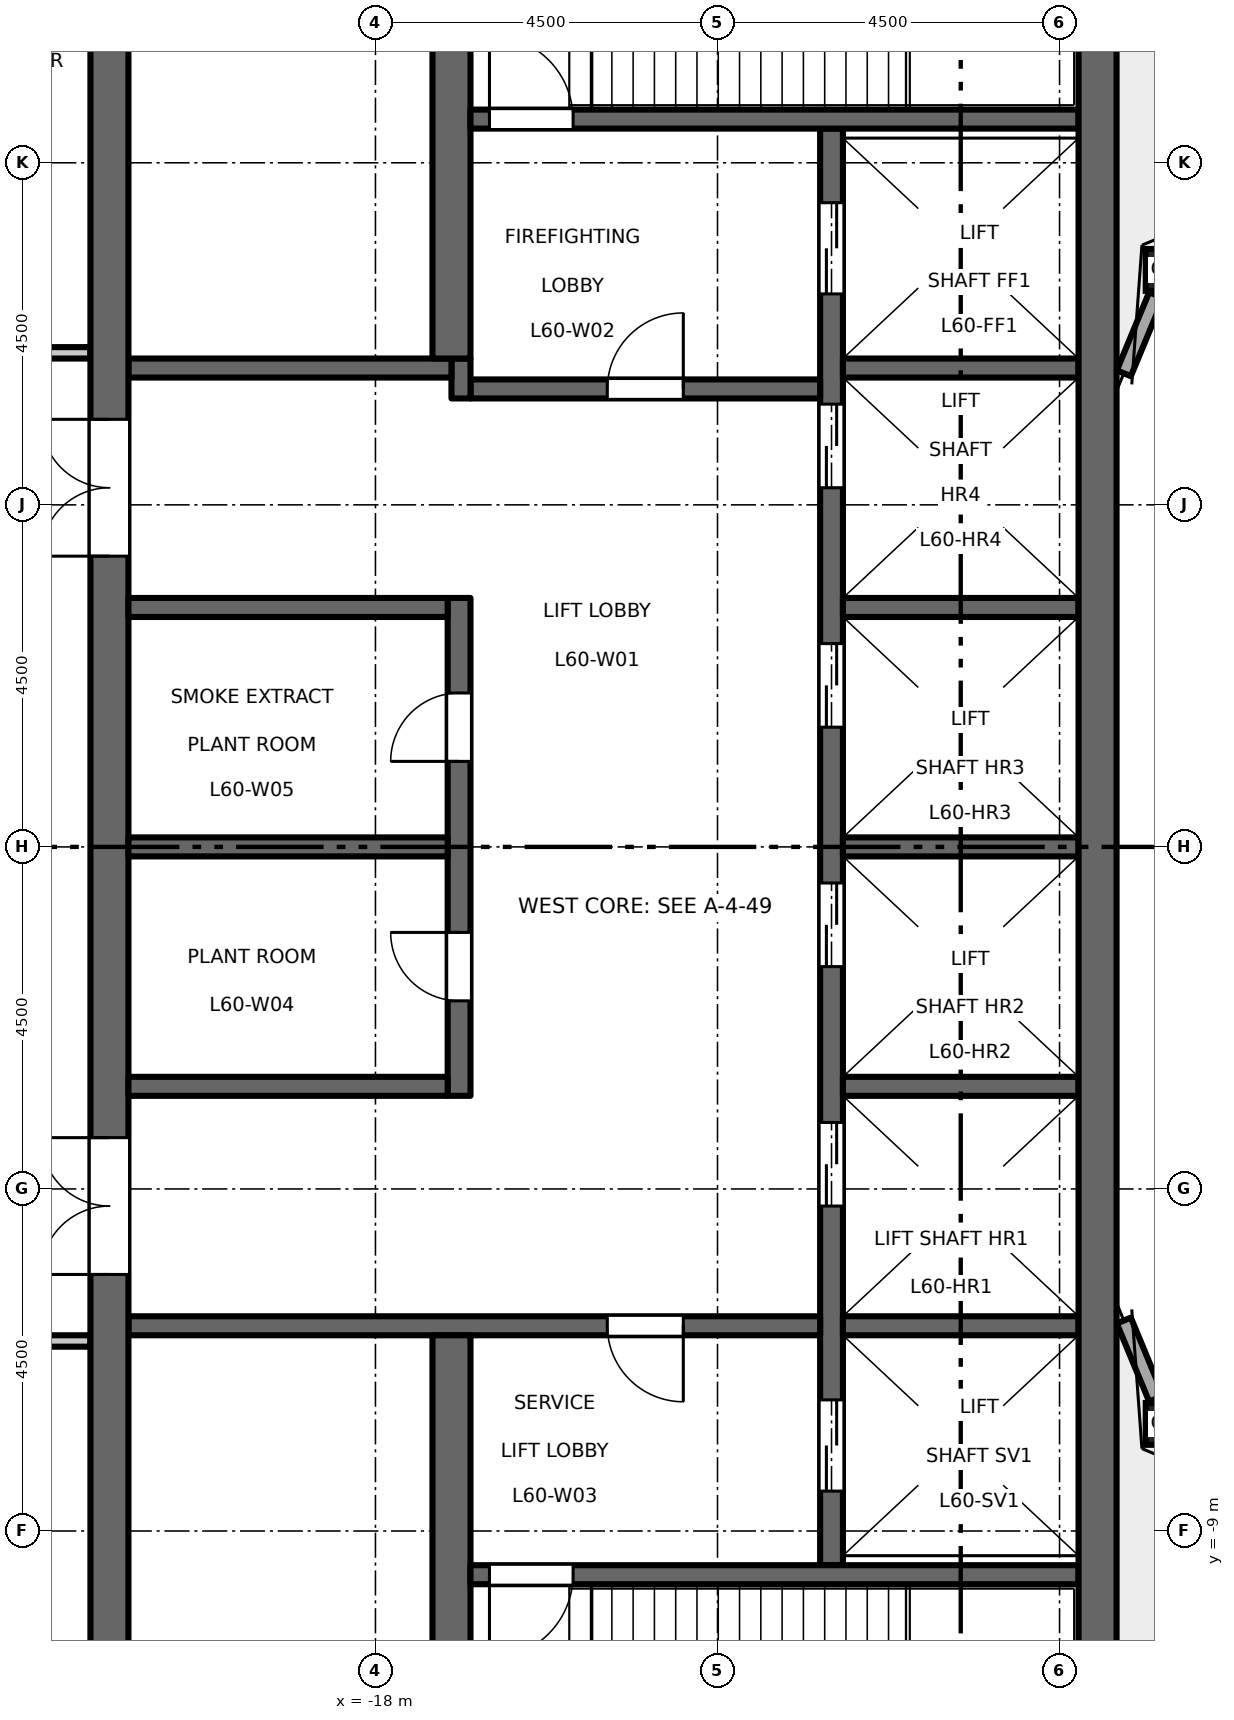
"""IFC4 building model, lengths in metres.
Left out: names, types, materials, properties, quantities, classifications, styles, units other than length and angle.
Written with IfcOpenShell. Run it as: python <this file> out.ifc"""

import sys

from ifc_helpers import new_model, si_unit, direction, frame, frame_2d, origin, origin_2d, place, context, subcontext, project, spatial, rectangle, hollow_rectangle, extrude, element, fill, save


model = new_model("IFC4")
c1 = context("Model", 3, precision=1e-05, world=origin(), true_north=direction((0.0, 1.0)))
c2 = subcontext(c1, "Body", "Model", "MODEL_VIEW")
j1 = project(units=[si_unit("LENGTHUNIT", "METRE"), si_unit("PLANEANGLEUNIT", "RADIAN")], contexts=[c1])
p1 = place(None, origin())
s1 = spatial("IfcSite", under=j1, at=p1, CompositionType="ELEMENT")
p2 = place(p1, origin())
s2 = spatial("IfcBuilding", under=s1, at=p2, CompositionType="ELEMENT")
p3 = place(p2, frame((0.0, 0.0, 278.2)))
s3 = spatial("IfcBuildingStorey", under=s2, at=p3, CompositionType="ELEMENT", Elevation=278.2)
for number, where, z_axis, x_axis in (
    (1, (-7.591, -7.591, 0.0), (0.0, 0.0, 1.0), (1.0, 0.0, 0.0)),
    (2, (-7.591, 7.591, 0.0), (0.0, 0.0, 1.0), (1.0, 0.0, 0.0)),
):
    element("IfcColumn", number, at=place(p3, frame(where, z_axis=z_axis, x_axis=x_axis)), inside=s3, PredefinedType="COLUMN", context=c2, shape_type="SweptSolid", body=[
        extrude(hollow_rectangle(XDim=0.55, YDim=0.55, WallThickness=0.028, at=origin_2d()), origin(), (0.0, 0.0, 1.0), 6.0),
    ])
p4 = place(p3, frame((-12.0, -9.45, 0.0), z_axis=(0.0, 0.0, 1.0), x_axis=(0.0, 1.0, 0.0)))
e3 = element("IfcWall", 3, at=p4, inside=s3, PredefinedType="SHEAR", context=c2, shape_type="SweptSolid", body=[
    extrude(rectangle(XDim=18.9, YDim=0.3, at=frame_2d((9.45, 0.0))), origin(), (0.0, 0.0, 1.0), 5.8),
])
p5 = place(p4, frame((4.725, 0.0, 0.0)))
e4 = element("IfcOpeningElement", 4, at=p5, cuts=e3, PredefinedType="OPENING", context=c2, shape_type="SweptSolid", body=[
    extrude(rectangle(XDim=1.1, YDim=2.1, at=frame_2d((0.55, 1.05))), frame((0.0, 0.16, 0.0), z_axis=(0.0, -1.0, 0.0), x_axis=(1.0, 0.0, 0.0)), (0.0, 0.0, 1.0), 0.32),
])
p6 = place(p4, frame((7.875, 0.0, 0.0)))
e5 = element("IfcOpeningElement", 5, at=p6, cuts=e3, PredefinedType="OPENING", context=c2, shape_type="SweptSolid", body=[
    extrude(rectangle(XDim=1.1, YDim=2.1, at=frame_2d((0.55, 1.05))), frame((0.0, 0.16, 0.0), z_axis=(0.0, -1.0, 0.0), x_axis=(1.0, 0.0, 0.0)), (0.0, 0.0, 1.0), 0.32),
])
p7 = place(p4, frame((11.025, 0.0, 0.0)))
e6 = element("IfcOpeningElement", 6, at=p7, cuts=e3, PredefinedType="OPENING", context=c2, shape_type="SweptSolid", body=[
    extrude(rectangle(XDim=1.1, YDim=2.1, at=frame_2d((0.55, 1.05))), frame((0.0, 0.16, 0.0), z_axis=(0.0, -1.0, 0.0), x_axis=(1.0, 0.0, 0.0)), (0.0, 0.0, 1.0), 0.32),
])
p8 = place(p4, frame((14.175, 0.0, 0.0)))
e7 = element("IfcOpeningElement", 7, at=p8, cuts=e3, PredefinedType="OPENING", context=c2, shape_type="SweptSolid", body=[
    extrude(rectangle(XDim=1.1, YDim=2.1, at=frame_2d((0.55, 1.05))), frame((0.0, 0.16, 0.0), z_axis=(0.0, -1.0, 0.0), x_axis=(1.0, 0.0, 0.0)), (0.0, 0.0, 1.0), 0.32),
])
p9 = place(p4, frame((16.725, 0.0, 0.0)))
e8 = element("IfcOpeningElement", 8, at=p9, cuts=e3, PredefinedType="OPENING", context=c2, shape_type="SweptSolid", body=[
    extrude(rectangle(XDim=1.2, YDim=2.1, at=frame_2d((0.6, 1.05))), frame((0.0, 0.16, 0.0), z_axis=(0.0, -1.0, 0.0), x_axis=(1.0, 0.0, 0.0)), (0.0, 0.0, 1.0), 0.32),
])
p10 = place(p4, frame((0.975, 0.0, 0.0)))
e9 = element("IfcOpeningElement", 9, at=p10, cuts=e3, PredefinedType="OPENING", context=c2, shape_type="SweptSolid", body=[
    extrude(rectangle(XDim=1.2, YDim=2.1, at=frame_2d((0.6, 1.05))), frame((0.0, 0.16, 0.0), z_axis=(0.0, -1.0, 0.0), x_axis=(1.0, 0.0, 0.0)), (0.0, 0.0, 1.0), 0.32),
])
p11 = place(p3, frame((-12.15, 6.025, 0.0), z_axis=(0.0, 0.0, 1.0), x_axis=(-1.0, 0.0, 0.0)))
e10 = element("IfcWall", 10, at=p11, inside=s3, PredefinedType="SHEAR", context=c2, shape_type="SweptSolid", body=[
    extrude(rectangle(XDim=4.6, YDim=0.25, at=frame_2d((2.3, 0.0))), origin(), (0.0, 0.0, 1.0), 5.8),
])
p12 = place(p11, frame((1.8, 0.0, 0.0)))
e11 = element("IfcOpeningElement", 11, at=p12, cuts=e10, PredefinedType="OPENING", context=c2, shape_type="SweptSolid", body=[
    extrude(rectangle(XDim=1.0, YDim=2.1, at=frame_2d((0.5, 1.05))), frame((0.0, 0.135, 0.0), z_axis=(0.0, -1.0, 0.0), x_axis=(1.0, 0.0, 0.0)), (0.0, 0.0, 1.0), 0.27),
])
p13 = place(p3, frame((-16.875, 5.9, 0.0), z_axis=(0.0, 0.0, 1.0), x_axis=(0.0, 1.0, 0.0)))
e12 = element("IfcWall", 12, at=p13, inside=s3, PredefinedType="SHEAR", context=c2, shape_type="SweptSolid", body=[
    extrude(rectangle(XDim=0.525, YDim=0.25, at=frame_2d((0.263, 0.0))), origin(), (0.0, 0.0, 1.0), 5.8),
])
p14 = place(p3, frame((-17.0, 6.3, 0.0), z_axis=(0.0, 0.0, 1.0), x_axis=(-1.0, 0.0, 0.0)))
e13 = element("IfcWall", 13, at=p14, inside=s3, PredefinedType="SHEAR", context=c2, shape_type="SweptSolid", body=[
    extrude(rectangle(XDim=4.25, YDim=0.25, at=frame_2d((2.125, 0.0))), origin(), (0.0, 0.0, 1.0), 5.8),
])
p15 = place(p3, frame((-12.15, -6.3, 0.0), z_axis=(0.0, 0.0, 1.0), x_axis=(-1.0, 0.0, 0.0)))
e14 = element("IfcWall", 14, at=p15, inside=s3, PredefinedType="SHEAR", context=c2, shape_type="SweptSolid", body=[
    extrude(rectangle(XDim=9.1, YDim=0.25, at=frame_2d((4.55, 0.0))), origin(), (0.0, 0.0, 1.0), 5.8),
])
p16 = place(p15, frame((1.8, 0.0, 0.0)))
e15 = element("IfcOpeningElement", 15, at=p16, cuts=e14, PredefinedType="OPENING", context=c2, shape_type="SweptSolid", body=[
    extrude(rectangle(XDim=1.0, YDim=2.1, at=frame_2d((0.5, 1.05))), frame((0.0, 0.135, 0.0), z_axis=(0.0, -1.0, 0.0), x_axis=(1.0, 0.0, 0.0)), (0.0, 0.0, 1.0), 0.27),
])
p17 = place(p3, frame((-21.5, -13.0, 0.0), z_axis=(0.0, 0.0, 1.0), x_axis=(0.0, 1.0, 0.0)))
e16 = element("IfcWall", 16, at=p17, inside=s3, PredefinedType="SHEAR", context=c2, shape_type="SweptSolid", body=[
    extrude(rectangle(XDim=26.0, YDim=0.5, at=frame_2d((13.0, 0.0))), origin(), (0.0, 0.0, 1.0), 5.8),
])
p18 = place(p17, frame((16.825, 0.0, 0.0)))
e17 = element("IfcOpeningElement", 17, at=p18, cuts=e16, PredefinedType="OPENING", context=c2, shape_type="SweptSolid", body=[
    extrude(rectangle(XDim=1.8, YDim=2.1, at=frame_2d((0.9, 1.05))), frame((0.0, 0.26, 0.0), z_axis=(0.0, -1.0, 0.0), x_axis=(1.0, 0.0, 0.0)), (0.0, 0.0, 1.0), 0.52),
])
p19 = place(p17, frame((7.375, 0.0, 0.0)))
e18 = element("IfcOpeningElement", 18, at=p19, cuts=e16, PredefinedType="OPENING", context=c2, shape_type="SweptSolid", body=[
    extrude(rectangle(XDim=1.8, YDim=2.1, at=frame_2d((0.9, 1.05))), frame((0.0, 0.26, 0.0), z_axis=(0.0, -1.0, 0.0), x_axis=(1.0, 0.0, 0.0)), (0.0, 0.0, 1.0), 0.52),
])
p20 = place(p3, frame((-16.9, -3.275, 0.0), z_axis=(0.0, 0.0, 1.0), x_axis=(0.0, 1.0, 0.0)))
e19 = element("IfcWall", 19, at=p20, inside=s3, PredefinedType="SHEAR", context=c2, shape_type="SweptSolid", body=[
    extrude(rectangle(XDim=6.55, YDim=0.3, at=frame_2d((3.275, 0.0))), origin(), (0.0, 0.0, 1.0), 5.8),
])
p21 = place(p20, frame((1.25, 0.0, 0.0)))
e20 = element("IfcOpeningElement", 20, at=p21, cuts=e19, PredefinedType="OPENING", context=c2, shape_type="SweptSolid", body=[
    extrude(rectangle(XDim=0.9, YDim=2.1, at=frame_2d((0.45, 1.05))), frame((0.0, 0.16, 0.0), z_axis=(0.0, -1.0, 0.0), x_axis=(1.0, 0.0, 0.0)), (0.0, 0.0, 1.0), 0.32),
])
p22 = place(p20, frame((4.4, 0.0, 0.0)))
e21 = element("IfcOpeningElement", 21, at=p22, cuts=e19, PredefinedType="OPENING", context=c2, shape_type="SweptSolid", body=[
    extrude(rectangle(XDim=0.9, YDim=2.1, at=frame_2d((0.45, 1.05))), frame((0.0, 0.16, 0.0), z_axis=(0.0, -1.0, 0.0), x_axis=(1.0, 0.0, 0.0)), (0.0, 0.0, 1.0), 0.32),
])
for number, where, z_axis, x_axis in (
    (22, (-17.05, 0.0, 0.0), (0.0, 0.0, 1.0), (-1.0, 0.0, 0.0)),
    (23, (-17.05, 3.15, 0.0), (0.0, 0.0, 1.0), (-1.0, 0.0, 0.0)),
    (24, (-17.05, -3.15, 0.0), (0.0, 0.0, 1.0), (-1.0, 0.0, 0.0)),
):
    element("IfcWall", number, at=place(p3, frame(where, z_axis=z_axis, x_axis=x_axis)), inside=s3, PredefinedType="SHEAR", context=c2, shape_type="SweptSolid", body=[
        extrude(rectangle(XDim=4.2, YDim=0.25, at=frame_2d((2.1, 0.0))), origin(), (0.0, 0.0, 1.0), 5.8),
    ])
for number, where, z_axis, x_axis in (
    (25, (-17.0, 6.425, 0.0), (0.0, 0.0, 1.0), (0.0, 1.0, 0.0)),
    (26, (-17.0, -13.0, 0.0), (0.0, 0.0, 1.0), (0.0, 1.0, 0.0)),
):
    element("IfcWall", number, at=place(p3, frame(where, z_axis=z_axis, x_axis=x_axis)), inside=s3, PredefinedType="SHEAR", context=c2, shape_type="SweptSolid", body=[
        extrude(rectangle(XDim=6.575, YDim=0.5, at=frame_2d((3.288, 0.0))), origin(), (0.0, 0.0, 1.0), 5.8),
    ])
for number, where, z_axis, x_axis in (
    (27, (-8.75, 0.0, 0.0), (0.0, 0.0, 1.0), (-1.0, 0.0, 0.0)),
    (28, (-8.75, 3.15, 0.0), (0.0, 0.0, 1.0), (-1.0, 0.0, 0.0)),
    (29, (-8.75, 6.3, 0.0), (0.0, 0.0, 1.0), (-1.0, 0.0, 0.0)),
    (30, (-8.75, -3.15, 0.0), (0.0, 0.0, 1.0), (-1.0, 0.0, 0.0)),
    (31, (-8.75, -6.3, 0.0), (0.0, 0.0, 1.0), (-1.0, 0.0, 0.0)),
):
    element("IfcWall", number, at=place(p3, frame(where, z_axis=z_axis, x_axis=x_axis)), inside=s3, PredefinedType="SHEAR", context=c2, shape_type="SweptSolid", body=[
        extrude(rectangle(XDim=3.1, YDim=0.25, at=frame_2d((1.55, 0.0))), origin(), (0.0, 0.0, 1.0), 5.8),
    ])
p23 = place(p3, frame((-8.75, 9.575, 0.0), z_axis=(0.0, 0.0, 1.0), x_axis=(-1.0, 0.0, 0.0)))
e32 = element("IfcWall", 32, at=p23, inside=s3, PredefinedType="SHEAR", context=c2, shape_type="SweptSolid", body=[
    extrude(rectangle(XDim=8.0, YDim=0.25, at=frame_2d((4.0, 0.0))), origin(), (0.0, 0.0, 1.0), 5.8),
])
p24 = place(p23, frame((6.65, 0.0, 0.0)))
e33 = element("IfcOpeningElement", 33, at=p24, cuts=e32, PredefinedType="OPENING", context=c2, shape_type="SweptSolid", body=[
    extrude(rectangle(XDim=1.1, YDim=2.1, at=frame_2d((0.55, 1.05))), frame((0.0, 0.135, 0.0), z_axis=(0.0, -1.0, 0.0), x_axis=(1.0, 0.0, 0.0)), (0.0, 0.0, 1.0), 0.27),
])
p25 = place(p3, frame((-8.75, -9.575, 0.0), z_axis=(0.0, 0.0, 1.0), x_axis=(-1.0, 0.0, 0.0)))
e34 = element("IfcWall", 34, at=p25, inside=s3, PredefinedType="SHEAR", context=c2, shape_type="SweptSolid", body=[
    extrude(rectangle(XDim=8.0, YDim=0.25, at=frame_2d((4.0, 0.0))), origin(), (0.0, 0.0, 1.0), 5.8),
])
p26 = place(p25, frame((6.65, 0.0, 0.0)))
e35 = element("IfcOpeningElement", 35, at=p26, cuts=e34, PredefinedType="OPENING", context=c2, shape_type="SweptSolid", body=[
    extrude(rectangle(XDim=1.1, YDim=2.1, at=frame_2d((0.55, 1.05))), frame((0.0, 0.135, 0.0), z_axis=(0.0, -1.0, 0.0), x_axis=(1.0, 0.0, 0.0)), (0.0, 0.0, 1.0), 0.27),
])
p27 = place(p3, frame((-8.5, -13.0, 0.0), z_axis=(0.0, 0.0, 1.0), x_axis=(0.0, 1.0, 0.0)))
e36 = element("IfcWall", 36, at=p27, inside=s3, PredefinedType="SHEAR", context=c2, shape_type="SweptSolid", body=[
    extrude(rectangle(XDim=26.0, YDim=0.5, at=frame_2d((13.0, 0.0))), origin(), (0.0, 0.0, 1.0), 5.8),
])
for number, where, z_axis, x_axis in (
    (37, (-7.729, 7.259, 0.0), (0.0, 0.0, 1.0), (-0.383, -0.924, 0.0)),
    (38, (-8.154, -6.231, 0.0), (0.0, 0.0, 1.0), (0.383, -0.924, 0.0)),
):
    element("IfcWall", number, at=place(p3, frame(where, z_axis=z_axis, x_axis=x_axis)), inside=s3, PredefinedType="STANDARD", context=c2, shape_type="SweptSolid", body=[
        extrude(rectangle(XDim=1.113, YDim=0.2, at=frame_2d((0.556, 0.0))), origin(), (0.0, 0.0, 1.0), 5.46),
    ])
p28 = place(p3, frame((-24.075, -6.5, 0.0), z_axis=(0.0, 0.0, 1.0), x_axis=(1.0, 0.0, 0.0)))
e39 = element("IfcWall", 39, at=p28, inside=s3, PredefinedType="PARTITIONING", context=c2, shape_type="SweptSolid", body=[
    extrude(rectangle(XDim=2.325, YDim=0.15, at=frame_2d((1.163, 0.0))), origin(), (0.0, 0.0, 1.0), 5.8),
])
p29 = place(p28, frame((0.575, 0.0, 0.0)))
e40 = element("IfcOpeningElement", 40, at=p29, cuts=e39, PredefinedType="OPENING", context=c2, shape_type="SweptSolid", body=[
    extrude(rectangle(XDim=1.0, YDim=2.1, at=frame_2d((0.5, 1.05))), frame((0.0, 0.085, 0.0), z_axis=(0.0, -1.0, 0.0), x_axis=(1.0, 0.0, 0.0)), (0.0, 0.0, 1.0), 0.17),
])
p30 = place(p3, frame((-24.075, 6.5, 0.0), z_axis=(0.0, 0.0, 1.0), x_axis=(1.0, 0.0, 0.0)))
e41 = element("IfcWall", 41, at=p30, inside=s3, PredefinedType="PARTITIONING", context=c2, shape_type="SweptSolid", body=[
    extrude(rectangle(XDim=2.325, YDim=0.15, at=frame_2d((1.163, 0.0))), origin(), (0.0, 0.0, 1.0), 5.8),
])
p31 = place(p30, frame((0.775, 0.0, 0.0)))
e42 = element("IfcOpeningElement", 42, at=p31, cuts=e41, PredefinedType="OPENING", context=c2, shape_type="SweptSolid", body=[
    extrude(rectangle(XDim=0.9, YDim=2.1, at=frame_2d((0.45, 1.05))), frame((0.0, 0.085, 0.0), z_axis=(0.0, -1.0, 0.0), x_axis=(1.0, 0.0, 0.0)), (0.0, 0.0, 1.0), 0.17),
])
p32 = place(p12, origin())
e43 = element("IfcDoor", 43, at=p32, inside=s3, OperationType="SINGLE_SWING_LEFT", PredefinedType="DOOR", context=c2, shape_type="SweptSolid", body=[
    extrude(rectangle(XDim=1.0, YDim=2.1, at=frame_2d((0.5, 1.05))), frame((0.0, 0.025, 0.0), z_axis=(0.0, -1.0, 0.0), x_axis=(1.0, 0.0, 0.0)), (0.0, 0.0, 1.0), 0.05),
])
fill(e11, e43)
p33 = place(p16, origin())
e44 = element("IfcDoor", 44, at=p33, inside=s3, OperationType="SINGLE_SWING_RIGHT", PredefinedType="DOOR", context=c2, shape_type="SweptSolid", body=[
    extrude(rectangle(XDim=1.0, YDim=2.1, at=frame_2d((0.5, 1.05))), frame((0.0, 0.025, 0.0), z_axis=(0.0, -1.0, 0.0), x_axis=(1.0, 0.0, 0.0)), (0.0, 0.0, 1.0), 0.05),
])
fill(e15, e44)
p34 = place(p24, origin())
e45 = element("IfcDoor", 45, at=p34, inside=s3, OperationType="SINGLE_SWING_RIGHT", PredefinedType="DOOR", context=c2, shape_type="SweptSolid", body=[
    extrude(rectangle(XDim=1.1, YDim=2.1, at=frame_2d((0.55, 1.05))), frame((0.0, 0.025, 0.0), z_axis=(0.0, -1.0, 0.0), x_axis=(1.0, 0.0, 0.0)), (0.0, 0.0, 1.0), 0.05),
])
fill(e33, e45)
p35 = place(p26, origin())
e46 = element("IfcDoor", 46, at=p35, inside=s3, OperationType="SINGLE_SWING_LEFT", PredefinedType="DOOR", context=c2, shape_type="SweptSolid", body=[
    extrude(rectangle(XDim=1.1, YDim=2.1, at=frame_2d((0.55, 1.05))), frame((0.0, 0.025, 0.0), z_axis=(0.0, -1.0, 0.0), x_axis=(1.0, 0.0, 0.0)), (0.0, 0.0, 1.0), 0.05),
])
fill(e35, e46)
p36 = place(p18, origin())
e47 = element("IfcDoor", 47, at=p36, inside=s3, OperationType="DOUBLE_DOOR_DOUBLE_SWING", PredefinedType="DOOR", context=c2, shape_type="SweptSolid", body=[
    extrude(rectangle(XDim=1.8, YDim=2.1, at=frame_2d((0.9, 1.05))), frame((0.0, 0.025, 0.0), z_axis=(0.0, -1.0, 0.0), x_axis=(1.0, 0.0, 0.0)), (0.0, 0.0, 1.0), 0.05),
])
fill(e17, e47)
p37 = place(p19, origin())
e48 = element("IfcDoor", 48, at=p37, inside=s3, OperationType="DOUBLE_DOOR_DOUBLE_SWING", PredefinedType="DOOR", context=c2, shape_type="SweptSolid", body=[
    extrude(rectangle(XDim=1.8, YDim=2.1, at=frame_2d((0.9, 1.05))), frame((0.0, 0.025, 0.0), z_axis=(0.0, -1.0, 0.0), x_axis=(1.0, 0.0, 0.0)), (0.0, 0.0, 1.0), 0.05),
])
fill(e18, e48)
p38 = place(p5, origin())
e49 = element("IfcDoor", 49, at=p38, inside=s3, OperationType="DOUBLE_DOOR_SLIDING", PredefinedType="DOOR", context=c2, shape_type="SweptSolid", body=[
    extrude(rectangle(XDim=1.1, YDim=2.1, at=frame_2d((0.55, 1.05))), frame((0.0, 0.025, 0.0), z_axis=(0.0, -1.0, 0.0), x_axis=(1.0, 0.0, 0.0)), (0.0, 0.0, 1.0), 0.05),
])
fill(e4, e49)
p39 = place(p6, origin())
e50 = element("IfcDoor", 50, at=p39, inside=s3, OperationType="DOUBLE_DOOR_SLIDING", PredefinedType="DOOR", context=c2, shape_type="SweptSolid", body=[
    extrude(rectangle(XDim=1.1, YDim=2.1, at=frame_2d((0.55, 1.05))), frame((0.0, 0.025, 0.0), z_axis=(0.0, -1.0, 0.0), x_axis=(1.0, 0.0, 0.0)), (0.0, 0.0, 1.0), 0.05),
])
fill(e5, e50)
p40 = place(p7, origin())
e51 = element("IfcDoor", 51, at=p40, inside=s3, OperationType="DOUBLE_DOOR_SLIDING", PredefinedType="DOOR", context=c2, shape_type="SweptSolid", body=[
    extrude(rectangle(XDim=1.1, YDim=2.1, at=frame_2d((0.55, 1.05))), frame((0.0, 0.025, 0.0), z_axis=(0.0, -1.0, 0.0), x_axis=(1.0, 0.0, 0.0)), (0.0, 0.0, 1.0), 0.05),
])
fill(e6, e51)
p41 = place(p8, origin())
e52 = element("IfcDoor", 52, at=p41, inside=s3, OperationType="DOUBLE_DOOR_SLIDING", PredefinedType="DOOR", context=c2, shape_type="SweptSolid", body=[
    extrude(rectangle(XDim=1.1, YDim=2.1, at=frame_2d((0.55, 1.05))), frame((0.0, 0.025, 0.0), z_axis=(0.0, -1.0, 0.0), x_axis=(1.0, 0.0, 0.0)), (0.0, 0.0, 1.0), 0.05),
])
fill(e7, e52)
p42 = place(p9, origin())
e53 = element("IfcDoor", 53, at=p42, inside=s3, OperationType="DOUBLE_DOOR_SLIDING", PredefinedType="DOOR", context=c2, shape_type="SweptSolid", body=[
    extrude(rectangle(XDim=1.2, YDim=2.1, at=frame_2d((0.6, 1.05))), frame((0.0, 0.025, 0.0), z_axis=(0.0, -1.0, 0.0), x_axis=(1.0, 0.0, 0.0)), (0.0, 0.0, 1.0), 0.05),
])
fill(e8, e53)
p43 = place(p10, origin())
e54 = element("IfcDoor", 54, at=p43, inside=s3, OperationType="DOUBLE_DOOR_SLIDING", PredefinedType="DOOR", context=c2, shape_type="SweptSolid", body=[
    extrude(rectangle(XDim=1.2, YDim=2.1, at=frame_2d((0.6, 1.05))), frame((0.0, 0.025, 0.0), z_axis=(0.0, -1.0, 0.0), x_axis=(1.0, 0.0, 0.0)), (0.0, 0.0, 1.0), 0.05),
])
fill(e9, e54)
p44 = place(p21, origin())
e55 = element("IfcDoor", 55, at=p44, inside=s3, OperationType="SINGLE_SWING_LEFT", PredefinedType="DOOR", context=c2, shape_type="SweptSolid", body=[
    extrude(rectangle(XDim=0.9, YDim=2.1, at=frame_2d((0.45, 1.05))), frame((0.0, 0.025, 0.0), z_axis=(0.0, -1.0, 0.0), x_axis=(1.0, 0.0, 0.0)), (0.0, 0.0, 1.0), 0.05),
])
fill(e20, e55)
p45 = place(p22, origin())
e56 = element("IfcDoor", 56, at=p45, inside=s3, OperationType="SINGLE_SWING_RIGHT", PredefinedType="DOOR", context=c2, shape_type="SweptSolid", body=[
    extrude(rectangle(XDim=0.9, YDim=2.1, at=frame_2d((0.45, 1.05))), frame((0.0, 0.025, 0.0), z_axis=(0.0, -1.0, 0.0), x_axis=(1.0, 0.0, 0.0)), (0.0, 0.0, 1.0), 0.05),
])
fill(e21, e56)
save(model, sys.argv[1])
